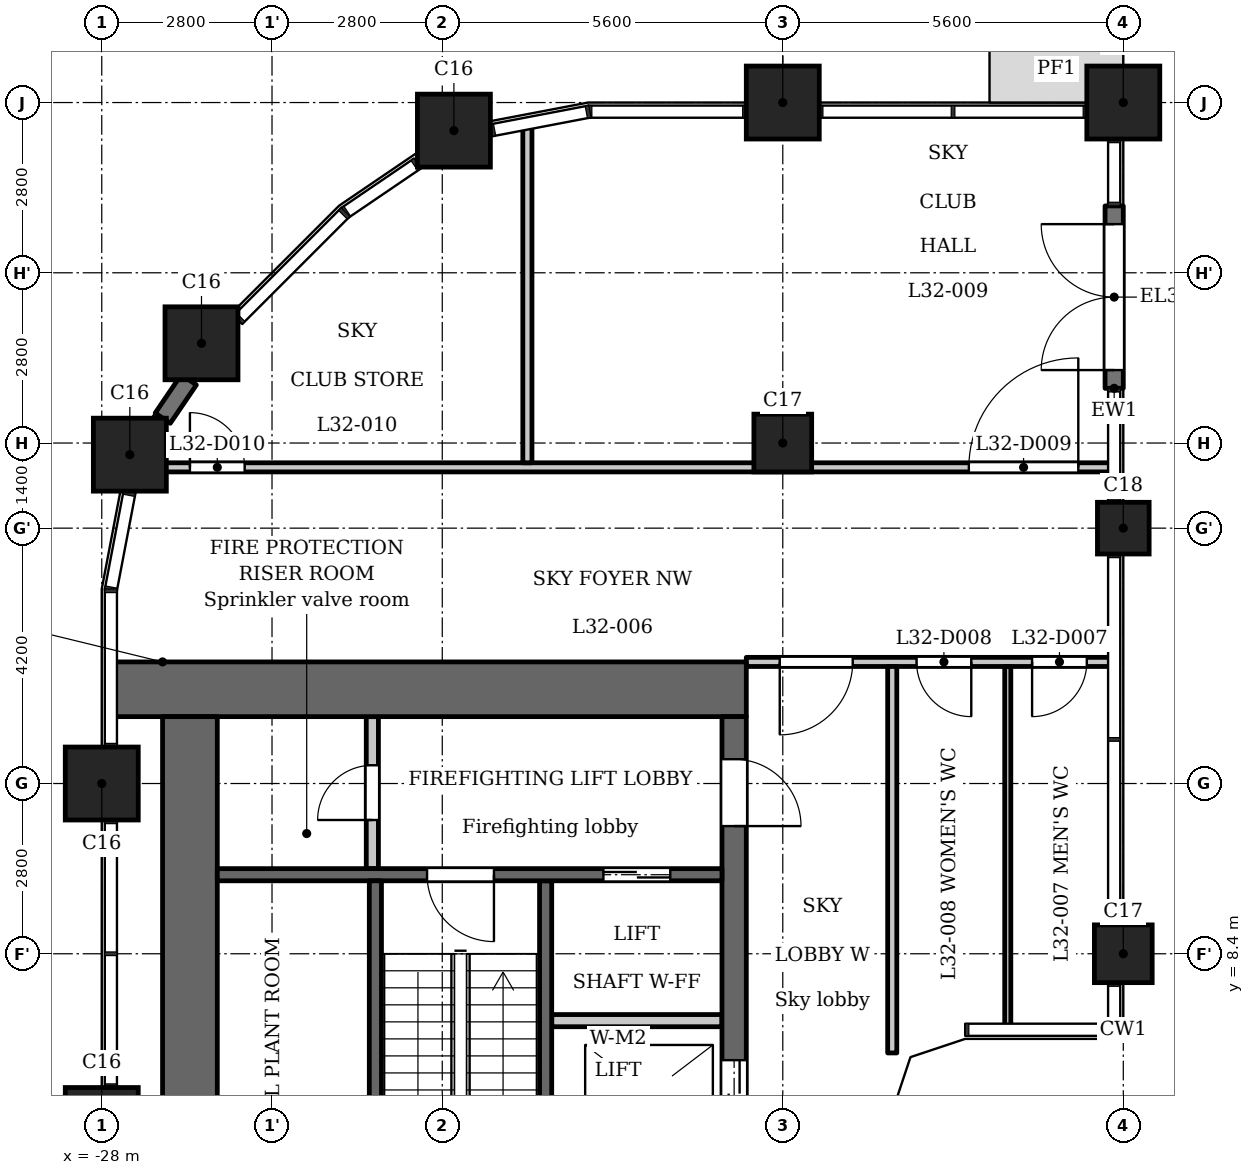
"""IFC4 building model, lengths in metres.
Left out: names, types, materials, properties, quantities, classifications, styles, units other than length and angle.
Written with IfcOpenShell. Run it as: python <this file> out.ifc"""

import sys

from ifc_helpers import new_model, si_unit, direction, frame, frame_2d, origin, origin_2d, place, context, subcontext, project, spatial, polyline, rectangle, outline, extrude, element, fill, save


model = new_model("IFC4")
c1 = context("Model", 3, precision=1e-05, world=origin(), true_north=direction((0.0, 1.0)))
c2 = subcontext(c1, "Body", "Model", "MODEL_VIEW")
j1 = project(units=[si_unit("LENGTHUNIT", "METRE"), si_unit("PLANEANGLEUNIT", "RADIAN")], contexts=[c1])
p1 = place(None, origin())
s1 = spatial("IfcSite", under=j1, at=p1, CompositionType="ELEMENT")
p2 = place(p1, origin())
s2 = spatial("IfcBuilding", under=s1, at=p2, CompositionType="ELEMENT")
p3 = place(p2, frame((0.0, 0.0, 125.3)))
s3 = spatial("IfcBuildingStorey", under=s2, at=p3, CompositionType="ELEMENT", Elevation=125.3)
for number, where, z_axis, x_axis in (
    (1, (-11.2, 22.4, 0.0), (0.0, 0.0, 1.0), (1.0, 0.0, 0.0)),
    (2, (-16.8, 22.4, 0.0), (0.0, 0.0, 1.0), (1.0, 0.0, 0.0)),
    (3, (-22.209, 21.938, 0.0), (0.0, 0.0, 1.0), (1.0, 0.0, 0.0)),
    (4, (-26.36, 18.44, 0.0), (0.0, 0.0, 1.0), (1.0, 0.0, 0.0)),
    (5, (-27.538, 16.609, 0.0), (0.0, 0.0, 1.0), (1.0, 0.0, 0.0)),
    (6, (-28.0, 11.2, 0.0), (0.0, 0.0, 1.0), (1.0, 0.0, 0.0)),
    (7, (-28.0, 5.6, 0.0), (0.0, 0.0, 1.0), (1.0, 0.0, 0.0)),
):
    element("IfcColumn", number, at=place(p3, frame(where, z_axis=z_axis, x_axis=x_axis)), inside=s3, PredefinedType="COLUMN", context=c2, shape_type="SweptSolid", body=[
        extrude(rectangle(XDim=1.2, YDim=1.2, at=origin_2d()), origin(), (0.0, 0.0, 1.0), 5.4),
    ])
for number, where, z_axis, x_axis in (
    (8, (-16.8, 16.8, 0.0), (0.0, 0.0, 1.0), (1.0, 0.0, 0.0)),
    (9, (-11.2, 8.4, 0.0), (0.0, 0.0, 1.0), (1.0, 0.0, 0.0)),
):
    element("IfcColumn", number, at=place(p3, frame(where, z_axis=z_axis, x_axis=x_axis)), inside=s3, PredefinedType="COLUMN", context=c2, shape_type="SweptSolid", body=[
        extrude(rectangle(XDim=0.95, YDim=0.95, at=origin_2d()), origin(), (0.0, 0.0, 1.0), 5.4),
    ])
p4 = place(p3, frame((-11.2, 15.4, 0.0), z_axis=(0.0, 0.0, 1.0), x_axis=(1.0, 0.0, 0.0)))
e10 = element("IfcColumn", 10, at=p4, inside=s3, PredefinedType="COLUMN", context=c2, shape_type="SweptSolid", body=[
    extrude(rectangle(XDim=0.85, YDim=0.85, at=origin_2d()), origin(), (0.0, 0.0, 1.0), 5.4),
])
p5 = place(p3, frame((-11.35, 17.7, 0.0), z_axis=(0.0, 0.0, 1.0), x_axis=(0.0, 1.0, 0.0)))
e11 = element("IfcWall", 11, at=p5, inside=s3, PredefinedType="SOLIDWALL", context=c2, shape_type="SweptSolid", body=[
    extrude(rectangle(XDim=3.0, YDim=0.3, at=frame_2d((1.5, 0.0))), origin(), (0.0, 0.0, 1.0), 4.95),
])
p6 = place(p5, frame((0.3, 0.0, 0.0)))
e12 = element("IfcOpeningElement", 12, at=p6, cuts=e11, PredefinedType="OPENING", context=c2, shape_type="SweptSolid", body=[
    extrude(rectangle(XDim=2.4, YDim=2.3, at=frame_2d((1.2, 1.15))), frame((0.0, 0.16, 0.0), z_axis=(0.0, -1.0, 0.0), x_axis=(1.0, 0.0, 0.0)), (0.0, 0.0, 1.0), 0.32),
])
p7 = place(p3, frame((-26.568, 17.84, 0.0), z_axis=(0.0, 0.0, 1.0), x_axis=(-0.561986273267, -0.82714655815, 0.0)))
e13 = element("IfcWall", 13, at=p7, inside=s3, PredefinedType="SOLIDWALL", context=c2, shape_type="SweptSolid", body=[
    extrude(rectangle(XDim=0.763, YDim=0.3, at=frame_2d((0.382, 0.0))), origin(), (0.0, 0.0, 1.0), 4.95),
])
p8 = place(p3, frame((-20.7, 2.6, 0.0), z_axis=(0.0, 0.0, 1.0), x_axis=(0.0, 1.0, 0.0)))
e14 = element("IfcWall", 14, at=p8, inside=s3, PredefinedType="SHEAR", context=c2, shape_type="SweptSolid", body=[
    extrude(rectangle(XDim=7.0, YDim=0.2, at=frame_2d((3.5, 0.0))), origin(), (0.0, 0.0, 1.0), 4.95),
])
p9 = place(p3, frame((-17.4, 12.75, 0.0), z_axis=(0.0, 0.0, 1.0), x_axis=(-1.0, 0.0, 0.0)))
e15 = element("IfcWall", 15, at=p9, inside=s3, PredefinedType="SHEAR", context=c2, shape_type="SweptSolid", body=[
    extrude(rectangle(XDim=10.4, YDim=0.9, at=frame_2d((5.2, 0.0))), origin(), (0.0, 0.0, 1.0), 4.95),
])
p10 = place(p3, frame((-17.6, -12.3, 0.0), z_axis=(0.0, 0.0, 1.0), x_axis=(0.0, 1.0, 0.0)))
e16 = element("IfcWall", 16, at=p10, inside=s3, PredefinedType="SHEAR", context=c2, shape_type="SweptSolid", body=[
    extrude(rectangle(XDim=24.6, YDim=0.4, at=frame_2d((12.3, 0.0))), origin(), (0.0, 0.0, 1.0), 4.95),
])
p11 = place(p10, frame((6.0, 0.0, 0.0)))
e17 = element("IfcOpeningElement", 17, at=p11, cuts=e16, PredefinedType="OPENING", context=c2, shape_type="SweptSolid", body=[
    extrude(rectangle(XDim=1.1, YDim=2.1, at=frame_2d((0.55, 1.05))), frame((0.0, 0.21, 0.0), z_axis=(0.0, -1.0, 0.0), x_axis=(1.0, 0.0, 0.0)), (0.0, 0.0, 1.0), 0.42),
])
p12 = place(p10, frame((8.4, 0.0, 0.0)))
e18 = element("IfcOpeningElement", 18, at=p12, cuts=e16, PredefinedType="OPENING", context=c2, shape_type="SweptSolid", body=[
    extrude(rectangle(XDim=1.1, YDim=2.1, at=frame_2d((0.55, 1.05))), frame((0.0, 0.21, 0.0), z_axis=(0.0, -1.0, 0.0), x_axis=(1.0, 0.0, 0.0)), (0.0, 0.0, 1.0), 0.42),
])
p13 = place(p10, frame((10.8, 0.0, 0.0)))
e19 = element("IfcOpeningElement", 19, at=p13, cuts=e16, PredefinedType="OPENING", context=c2, shape_type="SweptSolid", body=[
    extrude(rectangle(XDim=1.1, YDim=2.1, at=frame_2d((0.55, 1.05))), frame((0.0, 0.21, 0.0), z_axis=(0.0, -1.0, 0.0), x_axis=(1.0, 0.0, 0.0)), (0.0, 0.0, 1.0), 0.42),
])
p14 = place(p10, frame((15.45, 0.0, 0.0)))
e20 = element("IfcOpeningElement", 20, at=p14, cuts=e16, PredefinedType="OPENING", context=c2, shape_type="SweptSolid", body=[
    extrude(rectangle(XDim=1.1, YDim=2.1, at=frame_2d((0.55, 1.05))), frame((0.0, 0.21, 0.0), z_axis=(0.0, -1.0, 0.0), x_axis=(1.0, 0.0, 0.0)), (0.0, 0.0, 1.0), 0.42),
])
p15 = place(p10, frame((17.85, 0.0, 0.0)))
e21 = element("IfcOpeningElement", 21, at=p15, cuts=e16, PredefinedType="OPENING", context=c2, shape_type="SweptSolid", body=[
    extrude(rectangle(XDim=1.1, YDim=2.1, at=frame_2d((0.55, 1.05))), frame((0.0, 0.21, 0.0), z_axis=(0.0, -1.0, 0.0), x_axis=(1.0, 0.0, 0.0)), (0.0, 0.0, 1.0), 0.42),
])
p16 = place(p10, frame((22.8, 0.0, 0.0)))
e22 = element("IfcOpeningElement", 22, at=p16, cuts=e16, PredefinedType="OPENING", context=c2, shape_type="SweptSolid", body=[
    extrude(rectangle(XDim=1.1, YDim=2.1, at=frame_2d((0.55, 1.05))), frame((0.0, 0.21, 0.0), z_axis=(0.0, -1.0, 0.0), x_axis=(1.0, 0.0, 0.0)), (0.0, 0.0, 1.0), 0.42),
])
p17 = place(p10, frame((0.7, 0.0, 0.0)))
e23 = element("IfcOpeningElement", 23, at=p17, cuts=e16, PredefinedType="OPENING", context=c2, shape_type="SweptSolid", body=[
    extrude(rectangle(XDim=1.1, YDim=2.1, at=frame_2d((0.55, 1.05))), frame((0.0, 0.21, 0.0), z_axis=(0.0, -1.0, 0.0), x_axis=(1.0, 0.0, 0.0)), (0.0, 0.0, 1.0), 0.42),
])
p18 = place(p10, frame((12.775, 0.0, 0.0)))
e24 = element("IfcOpeningElement", 24, at=p18, cuts=e16, PredefinedType="OPENING", context=c2, shape_type="SweptSolid", body=[
    extrude(rectangle(XDim=1.8, YDim=2.1, at=frame_2d((0.9, 1.05))), frame((0.0, 0.21, 0.0), z_axis=(0.0, -1.0, 0.0), x_axis=(1.0, 0.0, 0.0)), (0.0, 0.0, 1.0), 0.42),
])
p19 = place(p3, frame((-26.55, -12.3, 0.0), z_axis=(0.0, 0.0, 1.0), x_axis=(0.0, 1.0, 0.0)))
e25 = element("IfcWall", 25, at=p19, inside=s3, PredefinedType="SHEAR", context=c2, shape_type="SweptSolid", body=[
    extrude(rectangle(XDim=24.6, YDim=0.9, at=frame_2d((12.3, 0.0))), origin(), (0.0, 0.0, 1.0), 4.95),
])
p20 = place(p3, frame((-23.55, 9.8, 0.0), z_axis=(0.0, 0.0, 1.0), x_axis=(0.0, 1.0, 0.0)))
e26 = element("IfcWall", 26, at=p20, inside=s3, PredefinedType="PARTITIONING", context=c2, shape_type="SweptSolid", body=[
    extrude(rectangle(XDim=2.5, YDim=0.2, at=frame_2d((1.25, 0.0))), origin(), (0.0, 0.0, 1.0), 4.95),
])
p21 = place(p20, frame((0.8, 0.0, 0.0)))
e27 = element("IfcOpeningElement", 27, at=p21, cuts=e26, PredefinedType="OPENING", context=c2, shape_type="SweptSolid", body=[
    extrude(rectangle(XDim=0.9, YDim=2.1, at=frame_2d((0.45, 1.05))), frame((0.0, 0.11, 0.0), z_axis=(0.0, -1.0, 0.0), x_axis=(1.0, 0.0, 0.0)), (0.0, 0.0, 1.0), 0.22),
])
p22 = place(p3, frame((-17.8, 7.3, 0.0), z_axis=(0.0, 0.0, 1.0), x_axis=(-1.0, 0.0, 0.0)))
e28 = element("IfcWall", 28, at=p22, inside=s3, PredefinedType="PARTITIONING", context=c2, shape_type="SweptSolid", body=[
    extrude(rectangle(XDim=2.8, YDim=0.2, at=frame_2d((1.4, 0.0))), origin(), (0.0, 0.0, 1.0), 4.95),
])
p23 = place(p3, frame((-17.8, 9.7, 0.0), z_axis=(0.0, 0.0, 1.0), x_axis=(-1.0, 0.0, 0.0)))
e29 = element("IfcWall", 29, at=p23, inside=s3, PredefinedType="SHEAR", context=c2, shape_type="SweptSolid", body=[
    extrude(rectangle(XDim=8.3, YDim=0.2, at=frame_2d((4.15, 0.0))), origin(), (0.0, 0.0, 1.0), 4.95),
])
p24 = place(p23, frame((0.85, 0.0, 0.0)))
e30 = element("IfcOpeningElement", 30, at=p24, cuts=e29, PredefinedType="OPENING", context=c2, shape_type="SweptSolid", body=[
    extrude(rectangle(XDim=1.1, YDim=2.1, at=frame_2d((0.55, 1.05))), frame((0.0, 0.11, 0.0), z_axis=(0.0, -1.0, 0.0), x_axis=(1.0, 0.0, 0.0)), (0.0, 0.0, 1.0), 0.22),
])
p25 = place(p23, frame((3.75, 0.0, 0.0)))
e31 = element("IfcOpeningElement", 31, at=p25, cuts=e29, PredefinedType="OPENING", context=c2, shape_type="SweptSolid", body=[
    extrude(rectangle(XDim=1.1, YDim=2.1, at=frame_2d((0.55, 1.05))), frame((0.0, 0.11, 0.0), z_axis=(0.0, -1.0, 0.0), x_axis=(1.0, 0.0, 0.0)), (0.0, 0.0, 1.0), 0.22),
])
p26 = place(p3, frame((-23.5, 2.6, 0.0), z_axis=(0.0, 0.0, 1.0), x_axis=(0.0, 1.0, 0.0)))
e32 = element("IfcWall", 32, at=p26, inside=s3, PredefinedType="SHEAR", context=c2, shape_type="SweptSolid", body=[
    extrude(rectangle(XDim=7.0, YDim=0.2, at=frame_2d((3.5, 0.0))), origin(), (0.0, 0.0, 1.0), 4.95),
])
p27 = place(p3, frame((-17.4, 13.2, 0.0), z_axis=(0.0, 0.0, 1.0), x_axis=(1.0, 0.0, 0.0)))
e33 = element("IfcWall", 33, at=p27, inside=s3, PredefinedType="PARTITIONING", context=c2, shape_type="SweptSolid", body=[
    extrude(rectangle(XDim=6.016, YDim=0.15, at=frame_2d((3.008, 0.0))), origin(), (0.0, 0.0, 1.0), 4.95),
])
p28 = place(p27, frame((0.55, 0.0, 0.0)))
e34 = element("IfcOpeningElement", 34, at=p28, cuts=e33, PredefinedType="OPENING", context=c2, shape_type="SweptSolid", body=[
    extrude(rectangle(XDim=1.2, YDim=2.1, at=frame_2d((0.6, 1.05))), frame((0.0, 0.085, 0.0), z_axis=(0.0, -1.0, 0.0), x_axis=(1.0, 0.0, 0.0)), (0.0, 0.0, 1.0), 0.17),
])
p29 = place(p27, frame((4.7, 0.0, 0.0)))
e35 = element("IfcOpeningElement", 35, at=p29, cuts=e33, PredefinedType="OPENING", context=c2, shape_type="SweptSolid", body=[
    extrude(rectangle(XDim=0.9, YDim=2.1, at=frame_2d((0.45, 1.05))), frame((0.0, 0.085, 0.0), z_axis=(0.0, -1.0, 0.0), x_axis=(1.0, 0.0, 0.0)), (0.0, 0.0, 1.0), 0.17),
])
p30 = place(p27, frame((2.8, 0.0, 0.0)))
e36 = element("IfcOpeningElement", 36, at=p30, cuts=e33, PredefinedType="OPENING", context=c2, shape_type="SweptSolid", body=[
    extrude(rectangle(XDim=0.9, YDim=2.1, at=frame_2d((0.45, 1.05))), frame((0.0, 0.085, 0.0), z_axis=(0.0, -1.0, 0.0), x_axis=(1.0, 0.0, 0.0)), (0.0, 0.0, 1.0), 0.17),
])
p31 = place(p3, frame((-27.52, 16.4, 0.0), z_axis=(0.0, 0.0, 1.0), x_axis=(1.0, 0.0, 0.0)))
e37 = element("IfcWall", 37, at=p31, inside=s3, PredefinedType="PARTITIONING", context=c2, shape_type="SweptSolid", body=[
    extrude(rectangle(XDim=16.136, YDim=0.15, at=frame_2d((8.068, 0.0))), origin(), (0.0, 0.0, 1.0), 4.95),
])
p32 = place(p31, frame((13.78, 0.0, 0.0)))
e38 = element("IfcOpeningElement", 38, at=p32, cuts=e37, PredefinedType="OPENING", context=c2, shape_type="SweptSolid", body=[
    extrude(rectangle(XDim=1.8, YDim=2.1, at=frame_2d((0.9, 1.05))), frame((0.0, 0.085, 0.0), z_axis=(0.0, -1.0, 0.0), x_axis=(1.0, 0.0, 0.0)), (0.0, 0.0, 1.0), 0.17),
])
p33 = place(p31, frame((0.97, 0.0, 0.0)))
e39 = element("IfcOpeningElement", 39, at=p33, cuts=e37, PredefinedType="OPENING", context=c2, shape_type="SweptSolid", body=[
    extrude(rectangle(XDim=0.9, YDim=2.1, at=frame_2d((0.45, 1.05))), frame((0.0, 0.085, 0.0), z_axis=(0.0, -1.0, 0.0), x_axis=(1.0, 0.0, 0.0)), (0.0, 0.0, 1.0), 0.17),
])
p34 = place(p3, frame((-21.0, 16.475, 0.0), z_axis=(0.0, 0.0, 1.0), x_axis=(0.0, 1.0, 0.0)))
e40 = element("IfcWall", 40, at=p34, inside=s3, PredefinedType="PARTITIONING", context=c2, shape_type="SweptSolid", body=[
    extrude(rectangle(XDim=5.547, YDim=0.15, at=frame_2d((2.773, 0.0))), origin(), (0.0, 0.0, 1.0), 4.95),
])
p35 = place(p3, frame((-15.0, 6.769, 0.0), z_axis=(0.0, 0.0, 1.0), x_axis=(0.0, 1.0, 0.0)))
e41 = element("IfcWall", 41, at=p35, inside=s3, PredefinedType="PARTITIONING", context=c2, shape_type="SweptSolid", body=[
    extrude(rectangle(XDim=6.356, YDim=0.15, at=frame_2d((3.178, 0.0))), origin(), (0.0, 0.0, 1.0), 4.95),
])
p36 = place(p3, frame((-13.1, 7.184, 0.0), z_axis=(0.0, 0.0, 1.0), x_axis=(0.0, 1.0, 0.0)))
e42 = element("IfcWall", 42, at=p36, inside=s3, PredefinedType="PARTITIONING", context=c2, shape_type="SweptSolid", body=[
    extrude(rectangle(XDim=5.941, YDim=0.1, at=frame_2d((2.97, 0.0))), origin(), (0.0, 0.0, 1.0), 4.95),
])
p37 = place(p3, origin())
e43 = element("IfcWall", 43, at=p37, inside=s3, PredefinedType="SOLIDWALL", context=c2, shape_type="SweptSolid", body=[
    extrude(outline(polyline([(-15.0, 5.8), (-14.7, 6.7), (-13.8, 7.0), (-13.8, 7.3), (-13.849, 7.3), (-14.937, 6.937), (-15.3, 5.849), (-15.3, 5.8), (-15.0, 5.8)])), origin(), (0.0, 0.0, 1.0), 4.95),
])
p38 = place(p6, origin())
e44 = element("IfcDoor", 44, at=p38, inside=s3, OperationType="SINGLE_SWING_LEFT", PredefinedType="DOOR", context=c2, shape_type="SweptSolid", body=[
    extrude(rectangle(XDim=2.4, YDim=2.3, at=frame_2d((1.2, 1.15))), frame((0.0, 0.025, 0.0), z_axis=(0.0, -1.0, 0.0), x_axis=(1.0, 0.0, 0.0)), (0.0, 0.0, 1.0), 0.05),
])
fill(e12, e44)
p39 = place(p15, origin())
e45 = element("IfcDoor", 45, at=p39, inside=s3, OperationType="DOUBLE_DOOR_SLIDING", PredefinedType="DOOR", context=c2, shape_type="SweptSolid", body=[
    extrude(rectangle(XDim=1.1, YDim=2.1, at=frame_2d((0.55, 1.05))), frame((0.0, 0.025, 0.0), z_axis=(0.0, -1.0, 0.0), x_axis=(1.0, 0.0, 0.0)), (0.0, 0.0, 1.0), 0.05),
])
fill(e21, e45)
p40 = place(p24, origin())
e46 = element("IfcDoor", 46, at=p40, inside=s3, OperationType="DOUBLE_DOOR_SLIDING", PredefinedType="DOOR", context=c2, shape_type="SweptSolid", body=[
    extrude(rectangle(XDim=1.1, YDim=2.1, at=frame_2d((0.55, 1.05))), frame((0.0, 0.025, 0.0), z_axis=(0.0, -1.0, 0.0), x_axis=(1.0, 0.0, 0.0)), (0.0, 0.0, 1.0), 0.05),
])
fill(e30, e46)
p41 = place(p16, origin())
e47 = element("IfcDoor", 47, at=p41, inside=s3, OperationType="SINGLE_SWING_LEFT", PredefinedType="DOOR", context=c2, shape_type="SweptSolid", body=[
    extrude(rectangle(XDim=1.1, YDim=2.1, at=frame_2d((0.55, 1.05))), frame((0.0, 0.025, 0.0), z_axis=(0.0, -1.0, 0.0), x_axis=(1.0, 0.0, 0.0)), (0.0, 0.0, 1.0), 0.05),
])
fill(e22, e47)
p42 = place(p21, origin())
e48 = element("IfcDoor", 48, at=p42, inside=s3, OperationType="SINGLE_SWING_RIGHT", PredefinedType="DOOR", context=c2, shape_type="SweptSolid", body=[
    extrude(rectangle(XDim=0.9, YDim=2.1, at=frame_2d((0.45, 1.05))), frame((0.0, 0.025, 0.0), z_axis=(0.0, -1.0, 0.0), x_axis=(1.0, 0.0, 0.0)), (0.0, 0.0, 1.0), 0.05),
])
fill(e27, e48)
p43 = place(p25, origin())
e49 = element("IfcDoor", 49, at=p43, inside=s3, OperationType="SINGLE_SWING_RIGHT", PredefinedType="DOOR", context=c2, shape_type="SweptSolid", body=[
    extrude(rectangle(XDim=1.1, YDim=2.1, at=frame_2d((0.55, 1.05))), frame((0.0, 0.025, 0.0), z_axis=(0.0, -1.0, 0.0), x_axis=(1.0, 0.0, 0.0)), (0.0, 0.0, 1.0), 0.05),
])
fill(e31, e49)
p44 = place(p28, origin())
e50 = element("IfcDoor", 50, at=p44, inside=s3, OperationType="SINGLE_SWING_LEFT", PredefinedType="DOOR", context=c2, shape_type="SweptSolid", body=[
    extrude(rectangle(XDim=1.2, YDim=2.1, at=frame_2d((0.6, 1.05))), frame((0.0, 0.025, 0.0), z_axis=(0.0, -1.0, 0.0), x_axis=(1.0, 0.0, 0.0)), (0.0, 0.0, 1.0), 0.05),
])
fill(e34, e50)
p45 = place(p29, origin())
e51 = element("IfcDoor", 51, at=p45, inside=s3, OperationType="SINGLE_SWING_LEFT", PredefinedType="DOOR", context=c2, shape_type="SweptSolid", body=[
    extrude(rectangle(XDim=0.9, YDim=2.1, at=frame_2d((0.45, 1.05))), frame((0.0, 0.025, 0.0), z_axis=(0.0, -1.0, 0.0), x_axis=(1.0, 0.0, 0.0)), (0.0, 0.0, 1.0), 0.05),
])
fill(e35, e51)
p46 = place(p30, origin())
e52 = element("IfcDoor", 52, at=p46, inside=s3, OperationType="SINGLE_SWING_RIGHT", PredefinedType="DOOR", context=c2, shape_type="SweptSolid", body=[
    extrude(rectangle(XDim=0.9, YDim=2.1, at=frame_2d((0.45, 1.05))), frame((0.0, 0.025, 0.0), z_axis=(0.0, -1.0, 0.0), x_axis=(1.0, 0.0, 0.0)), (0.0, 0.0, 1.0), 0.05),
])
fill(e36, e52)
p47 = place(p32, origin())
e53 = element("IfcDoor", 53, at=p47, inside=s3, OperationType="SINGLE_SWING_LEFT", PredefinedType="DOOR", context=c2, shape_type="SweptSolid", body=[
    extrude(rectangle(XDim=1.8, YDim=2.1, at=frame_2d((0.9, 1.05))), frame((0.0, 0.025, 0.0), z_axis=(0.0, -1.0, 0.0), x_axis=(1.0, 0.0, 0.0)), (0.0, 0.0, 1.0), 0.05),
])
fill(e38, e53)
p48 = place(p33, origin())
e54 = element("IfcDoor", 54, at=p48, inside=s3, OperationType="SINGLE_SWING_RIGHT", PredefinedType="DOOR", context=c2, shape_type="SweptSolid", body=[
    extrude(rectangle(XDim=0.9, YDim=2.1, at=frame_2d((0.45, 1.05))), frame((0.0, 0.025, 0.0), z_axis=(0.0, -1.0, 0.0), x_axis=(1.0, 0.0, 0.0)), (0.0, 0.0, 1.0), 0.05),
])
fill(e39, e54)
save(model, sys.argv[1])
